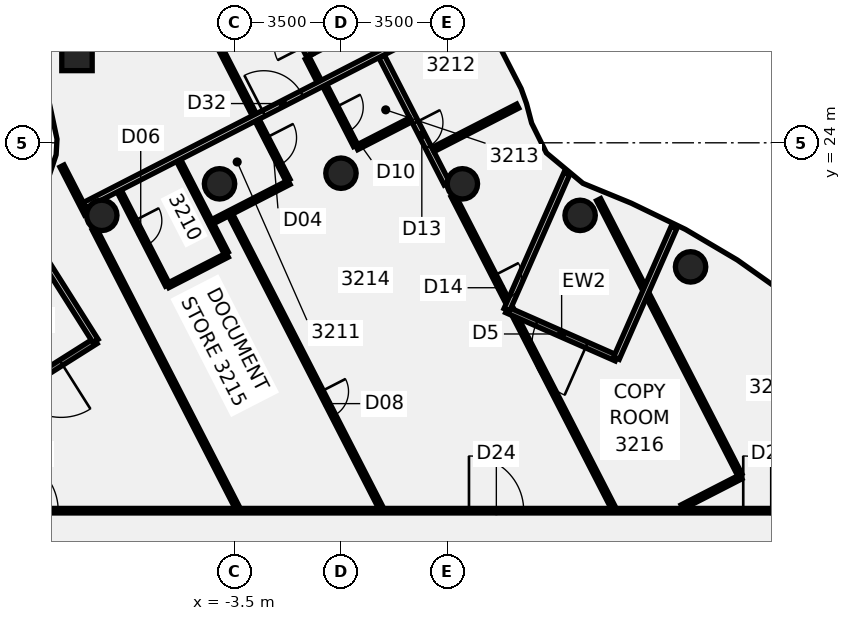
"""IFC4 building model, lengths in metres.
Left out: names, types, materials, properties, quantities, classifications, styles, units other than length and angle.
Written with IfcOpenShell. Run it as: python <this file> out.ifc"""

import sys

from ifc_helpers import new_model, si_unit, direction, frame, frame_2d, origin, origin_2d, place, context, subcontext, project, spatial, rectangle, circle, extrude, element, fill, save


model = new_model("IFC4")
c1 = context("Model", 3, precision=1e-05, world=origin(), true_north=direction((0.0, 1.0)))
c2 = subcontext(c1, "Body", "Model", "MODEL_VIEW")
j1 = project(units=[si_unit("LENGTHUNIT", "METRE"), si_unit("PLANEANGLEUNIT", "RADIAN")], contexts=[c1])
p1 = place(None, origin())
s1 = spatial("IfcSite", under=j1, at=p1, CompositionType="ELEMENT")
p2 = place(p1, origin())
s2 = spatial("IfcBuilding", under=s1, at=p2, CompositionType="ELEMENT")
p3 = place(p2, frame((0.0, 0.0, 133.0)))
s3 = spatial("IfcBuildingStorey", under=s2, at=p3, CompositionType="ELEMENT", Elevation=133.0)
for number, where, z_axis, x_axis in (
    (1, (11.5, 19.919, -0.14), (0.0, 0.0, 1.0), (1.0, 0.0, 0.0)),
    (2, (7.866, 21.613, -0.14), (0.0, 0.0, 1.0), (1.0, 0.0, 0.0)),
    (3, (3.994, 22.651, -0.14), (0.0, 0.0, 1.0), (1.0, 0.0, 0.0)),
    (4, (0.0, 23.0, -0.14), (0.0, 0.0, 1.0), (1.0, 0.0, 0.0)),
    (5, (-3.994, 22.651, -0.14), (0.0, 0.0, 1.0), (1.0, 0.0, 0.0)),
    (6, (-7.866, 21.613, -0.14), (0.0, 0.0, 1.0), (1.0, 0.0, 0.0)),
):
    element("IfcColumn", number, at=place(p3, frame(where, z_axis=z_axis, x_axis=x_axis)), inside=s3, PredefinedType="COLUMN", context=c2, shape_type="SweptSolid", body=[
        extrude(circle(Radius=0.5, at=origin_2d()), origin(), (0.0, 0.0, 1.0), 3.75),
    ])
p4 = place(p3, frame((-8.683, 26.873, -0.136), z_axis=(-0.023249815242, -0.042396721911, 0.99883029793), x_axis=(0.888891864763, 0.45636204272, 0.040061686479)))
e7 = element("IfcColumn", 7, at=p4, inside=s3, PredefinedType="COLUMN", context=c2, shape_type="SweptSolid", body=[
    extrude(rectangle(XDim=1.0, YDim=1.0, at=origin_2d()), origin(), (0.0, 0.0, 1.0), 3.749),
])
p5 = place(p3, frame((-9.176, 23.235, 0.0), z_axis=(0.0, 0.0, 1.0), x_axis=(0.456484124578, -0.889731557273, 0.0)))
e8 = element("IfcWall", 8, at=p5, inside=s3, PredefinedType="PARTITIONING", context=c2, shape_type="SweptSolid", body=[
    extrude(rectangle(XDim=1.776, YDim=0.15, at=frame_2d((0.888, 0.0))), origin(), (0.0, 0.0, 1.0), 3.01),
])
p6 = place(p3, frame((-8.116, 21.17, 0.0), z_axis=(0.0, 0.0, 1.0), x_axis=(0.456543941527, -0.889700865154, 0.0)))
e9 = element("IfcWall", 9, at=p6, inside=s3, PredefinedType="PARTITIONING", context=c2, shape_type="SweptSolid", body=[
    extrude(rectangle(XDim=10.314, YDim=0.15, at=frame_2d((5.157, 0.0))), origin(), (0.0, 0.0, 1.0), 3.01),
])
p7 = place(p3, frame((-8.932, 36.777, 0.0), z_axis=(0.0, 0.0, 1.0), x_axis=(0.456530071129, -0.889707982517, 0.0)))
e10 = element("IfcWall", 10, at=p7, inside=s3, PredefinedType="PARTITIONING", context=c2, shape_type="SweptSolid", body=[
    extrude(rectangle(XDim=15.745, YDim=0.15, at=frame_2d((7.873, 0.0))), origin(), (0.0, 0.0, 1.0), 3.01),
])
p8 = place(p7, frame((14.175, 0.0, 0.0)))
e11 = element("IfcOpeningElement", 11, at=p8, cuts=e10, PredefinedType="OPENING", context=c2, shape_type="SweptSolid", body=[
    extrude(rectangle(XDim=1.0, YDim=2.1, at=frame_2d((0.5, 1.05))), frame((0.0, 0.085, 0.0), z_axis=(0.0, -1.0, 0.0), x_axis=(1.0, 0.0, 0.0)), (0.0, 0.0, 1.0), 0.17),
])
p9 = place(p7, frame((4.425, 0.0, 0.0)))
e12 = element("IfcOpeningElement", 12, at=p9, cuts=e10, PredefinedType="OPENING", context=c2, shape_type="SweptSolid", body=[
    extrude(rectangle(XDim=0.9, YDim=2.1, at=frame_2d((0.45, 1.05))), frame((0.0, 0.085, 0.0), z_axis=(0.0, -1.0, 0.0), x_axis=(1.0, 0.0, 0.0)), (0.0, 0.0, 1.0), 0.17),
])
p10 = place(p3, frame((-7.294, 22.416, 0.0), z_axis=(0.0, 0.0, 1.0), x_axis=(0.456617130673, -0.889663304838, 0.0)))
e13 = element("IfcWall", 13, at=p10, inside=s3, PredefinedType="PARTITIONING", context=c2, shape_type="SweptSolid", body=[
    extrude(rectangle(XDim=3.48, YDim=0.15, at=frame_2d((1.74, 0.0))), origin(), (0.0, 0.0, 1.0), 3.01),
])
p11 = place(p10, frame((1.1, 0.0, 0.0)))
e14 = element("IfcOpeningElement", 14, at=p11, cuts=e13, PredefinedType="OPENING", context=c2, shape_type="SweptSolid", body=[
    extrude(rectangle(XDim=0.9, YDim=2.1, at=frame_2d((0.45, 1.05))), frame((0.0, 0.085, 0.0), z_axis=(0.0, -1.0, 0.0), x_axis=(1.0, 0.0, 0.0)), (0.0, 0.0, 1.0), 0.17),
])
p12 = place(p3, frame((-1.105, 26.783, 0.0), z_axis=(0.0, 0.0, 1.0), x_axis=(0.456670300409, -0.889636013617, 0.0)))
e15 = element("IfcWall", 15, at=p12, inside=s3, PredefinedType="PARTITIONING", context=c2, shape_type="SweptSolid", body=[
    extrude(rectangle(XDim=0.855, YDim=0.15, at=frame_2d((0.427, 0.0))), origin(), (0.0, 0.0, 1.0), 3.01),
])
p13 = place(p3, frame((-5.337, 23.42, 0.0), z_axis=(0.0, 0.0, 1.0), x_axis=(0.456682724055, -0.889629636169, 0.0)))
e16 = element("IfcWall", 16, at=p13, inside=s3, PredefinedType="PARTITIONING", context=c2, shape_type="SweptSolid", body=[
    extrude(rectangle(XDim=3.425, YDim=0.15, at=frame_2d((1.712, 0.0))), origin(), (0.0, 0.0, 1.0), 3.01),
])
p14 = place(p3, frame((-3.63, 21.627, 0.0), z_axis=(0.0, 0.0, 1.0), x_axis=(0.456496994871, -0.889724953946, 0.0)))
e17 = element("IfcWall", 17, at=p14, inside=s3, PredefinedType="PARTITIONING", context=c2, shape_type="SweptSolid", body=[
    extrude(rectangle(XDim=10.828, YDim=0.15, at=frame_2d((5.414, 0.0))), origin(), (0.0, 0.0, 1.0), 3.01),
])
p15 = place(p14, frame((6.525, 0.0, 0.0)))
e18 = element("IfcOpeningElement", 18, at=p15, cuts=e17, PredefinedType="OPENING", context=c2, shape_type="SweptSolid", body=[
    extrude(rectangle(XDim=0.9, YDim=2.1, at=frame_2d((0.45, 1.05))), frame((0.0, 0.085, 0.0), z_axis=(0.0, -1.0, 0.0), x_axis=(1.0, 0.0, 0.0)), (0.0, 0.0, 1.0), 0.17),
])
p16 = place(p3, frame((-0.532, 25.885, 0.0), z_axis=(0.0, 0.0, 1.0), x_axis=(0.456385875157, -0.889781958098, 0.0)))
e19 = element("IfcWall", 19, at=p16, inside=s3, PredefinedType="PARTITIONING", context=c2, shape_type="SweptSolid", body=[
    extrude(rectangle(XDim=2.219, YDim=0.15, at=frame_2d((1.11, 0.0))), origin(), (0.0, 0.0, 1.0), 3.01),
])
p17 = place(p16, frame((0.8, 0.0, 0.0)))
e20 = element("IfcOpeningElement", 20, at=p17, cuts=e19, PredefinedType="OPENING", context=c2, shape_type="SweptSolid", body=[
    extrude(rectangle(XDim=0.9, YDim=2.1, at=frame_2d((0.45, 1.05))), frame((0.0, 0.085, 0.0), z_axis=(0.0, -1.0, 0.0), x_axis=(1.0, 0.0, 0.0)), (0.0, 0.0, 1.0), 0.17),
])
p18 = place(p3, frame((1.336, 26.844, 0.0), z_axis=(0.0, 0.0, 1.0), x_axis=(0.456669351615, -0.889636500654, 0.0)))
e21 = element("IfcWall", 21, at=p18, inside=s3, PredefinedType="PARTITIONING", context=c2, shape_type="SweptSolid", body=[
    extrude(rectangle(XDim=4.707, YDim=0.2, at=frame_2d((2.354, 0.0))), origin(), (0.0, 0.0, 1.0), 3.01),
])
p19 = place(p18, frame((2.45, 0.0, 0.0)))
e22 = element("IfcOpeningElement", 22, at=p19, cuts=e21, PredefinedType="OPENING", context=c2, shape_type="SweptSolid", body=[
    extrude(rectangle(XDim=0.9, YDim=2.1, at=frame_2d((0.45, 1.05))), frame((0.0, 0.11, 0.0), z_axis=(0.0, -1.0, 0.0), x_axis=(1.0, 0.0, 0.0)), (0.0, 0.0, 1.0), 0.22),
])
p20 = place(p3, frame((3.69, 22.258, 0.0), z_axis=(0.0, 0.0, 1.0), x_axis=(0.45668207617, -0.889629968754, 0.0)))
e23 = element("IfcWall", 23, at=p20, inside=s3, PredefinedType="PARTITIONING", context=c2, shape_type="SweptSolid", body=[
    extrude(rectangle(XDim=11.542, YDim=0.15, at=frame_2d((5.771, 0.0))), origin(), (0.0, 0.0, 1.0), 3.01),
])
p21 = place(p20, frame((2.95, 0.0, 0.0)))
e24 = element("IfcOpeningElement", 24, at=p21, cuts=e23, PredefinedType="OPENING", context=c2, shape_type="SweptSolid", body=[
    extrude(rectangle(XDim=0.9, YDim=2.1, at=frame_2d((0.45, 1.05))), frame((0.0, 0.085, 0.0), z_axis=(0.0, -1.0, 0.0), x_axis=(1.0, 0.0, 0.0)), (0.0, 0.0, 1.0), 0.17),
])
p22 = place(p3, frame((8.476, 22.13, 0.0), z_axis=(0.0, 0.0, 1.0), x_axis=(0.456531545436, -0.889707226014, 0.0)))
e25 = element("IfcWall", 25, at=p22, inside=s3, PredefinedType="PARTITIONING", context=c2, shape_type="SweptSolid", body=[
    extrude(rectangle(XDim=10.171, YDim=0.15, at=frame_2d((5.085, 0.0))), origin(), (0.0, 0.0, 1.0), 3.01),
])
p23 = place(p3, frame((-17.065, 11.9, 0.0), z_axis=(0.0, 0.0, 1.0), x_axis=(1.0, 0.0, 0.0)))
e26 = element("IfcWall", 26, at=p23, inside=s3, PredefinedType="PARTITIONING", context=c2, shape_type="SweptSolid", body=[
    extrude(rectangle(XDim=34.165, YDim=0.15, at=frame_2d((17.083, 0.0))), origin(), (0.0, 0.0, 1.0), 3.01),
])
p24 = place(p23, frame((21.276, 0.0, 0.0)))
e27 = element("IfcOpeningElement", 27, at=p24, cuts=e26, PredefinedType="OPENING", context=c2, shape_type="SweptSolid", body=[
    extrude(rectangle(XDim=1.8, YDim=2.1, at=frame_2d((0.9, 1.05))), frame((0.0, 0.085, 0.0), z_axis=(0.0, -1.0, 0.0), x_axis=(1.0, 0.0, 0.0)), (0.0, 0.0, 1.0), 0.17),
])
p25 = place(p23, frame((30.297, 0.0, 0.0)))
e28 = element("IfcOpeningElement", 28, at=p25, cuts=e26, PredefinedType="OPENING", context=c2, shape_type="SweptSolid", body=[
    extrude(rectangle(XDim=1.8, YDim=2.1, at=frame_2d((0.9, 1.05))), frame((0.0, 0.085, 0.0), z_axis=(0.0, -1.0, 0.0), x_axis=(1.0, 0.0, 0.0)), (0.0, 0.0, 1.0), 0.17),
])
p26 = place(p23, frame((5.965, 0.0, 0.0)))
e29 = element("IfcOpeningElement", 29, at=p26, cuts=e26, PredefinedType="OPENING", context=c2, shape_type="SweptSolid", body=[
    extrude(rectangle(XDim=1.8, YDim=2.1, at=frame_2d((0.9, 1.05))), frame((0.0, 0.085, 0.0), z_axis=(0.0, -1.0, 0.0), x_axis=(1.0, 0.0, 0.0)), (0.0, 0.0, 1.0), 0.17),
])
p27 = place(p3, frame((-8.426, 21.948, 0.0), z_axis=(0.0, 0.0, 1.0), x_axis=(0.889606613969, 0.456727569108, 0.0)))
e30 = element("IfcWall", 30, at=p27, inside=s3, PredefinedType="PARTITIONING", context=c2, shape_type="SweptSolid", body=[
    extrude(rectangle(XDim=14.219, YDim=0.2, at=frame_2d((7.11, 0.0))), origin(), (0.0, 0.0, 1.0), 3.01),
])
p28 = place(p27, frame((6.62, 0.0, 0.0)))
e31 = element("IfcOpeningElement", 31, at=p28, cuts=e30, PredefinedType="OPENING", context=c2, shape_type="SweptSolid", body=[
    extrude(rectangle(XDim=1.4, YDim=2.1, at=frame_2d((0.7, 1.05))), frame((0.0, 0.11, 0.0), z_axis=(0.0, -1.0, 0.0), x_axis=(1.0, 0.0, 0.0)), (0.0, 0.0, 1.0), 0.22),
])
p29 = place(p3, frame((-5.696, 19.302, 0.0), z_axis=(0.0, 0.0, 1.0), x_axis=(0.889761986003, 0.456424811183, 0.0)))
e32 = element("IfcWall", 32, at=p29, inside=s3, PredefinedType="PARTITIONING", context=c2, shape_type="SweptSolid", body=[
    extrude(rectangle(XDim=2.199, YDim=0.15, at=frame_2d((1.1, 0.0))), origin(), (0.0, 0.0, 1.0), 3.01),
])
p30 = place(p3, frame((3.028, 23.778, 0.0), z_axis=(0.0, 0.0, 1.0), x_axis=(0.889763060591, 0.456422716358, 0.0)))
e33 = element("IfcWall", 33, at=p30, inside=s3, PredefinedType="PARTITIONING", context=c2, shape_type="SweptSolid", body=[
    extrude(rectangle(XDim=3.131, YDim=0.15, at=frame_2d((1.565, 0.0))), origin(), (0.0, 0.0, 1.0), 3.01),
])
p31 = place(p3, frame((-4.22, 21.408, 0.0), z_axis=(0.0, 0.0, 1.0), x_axis=(0.889499615921, 0.456935918128, 0.0)))
e34 = element("IfcWall", 34, at=p31, inside=s3, PredefinedType="PARTITIONING", context=c2, shape_type="SweptSolid", body=[
    extrude(rectangle(XDim=2.825, YDim=0.15, at=frame_2d((1.413, 0.0))), origin(), (0.0, 0.0, 1.0), 3.01),
])
p32 = place(p3, frame((0.516, 23.841, 0.0), z_axis=(0.0, 0.0, 1.0), x_axis=(0.889517422717, 0.456901252662, 0.0)))
e35 = element("IfcWall", 35, at=p32, inside=s3, PredefinedType="PARTITIONING", context=c2, shape_type="SweptSolid", body=[
    extrude(rectangle(XDim=2.0, YDim=0.15, at=frame_2d((1.0, 0.0))), origin(), (0.0, 0.0, 1.0), 3.01),
])
p33 = place(p3, frame((11.222, 12.023, 0.0), z_axis=(0.0, 0.0, 1.0), x_axis=(0.889721403814, 0.456503914108, 0.0)))
e36 = element("IfcWall", 36, at=p33, inside=s3, PredefinedType="PARTITIONING", context=c2, shape_type="SweptSolid", body=[
    extrude(rectangle(XDim=2.17, YDim=0.15, at=frame_2d((1.085, 0.0))), origin(), (0.0, 0.0, 1.0), 3.01),
])
p34 = place(p3, frame((9.061, 16.918, 0.0), z_axis=(0.0, 0.0, 1.0), x_axis=(-0.915163294104, 0.403083297999, 0.0)))
e37 = element("IfcWall", 37, at=p34, inside=s3, PredefinedType="SOLIDWALL", context=c2, shape_type="SweptSolid", body=[
    extrude(rectangle(XDim=3.94, YDim=0.2, at=frame_2d((1.97, 0.0))), origin(), (0.0, 0.0, 1.0), 3.61),
])
p35 = place(p34, frame((1.07, 0.0, 0.0)))
e38 = element("IfcOpeningElement", 38, at=p35, cuts=e37, PredefinedType="OPENING", context=c2, shape_type="SweptSolid", body=[
    extrude(rectangle(XDim=1.8, YDim=2.4, at=frame_2d((0.9, 1.2))), frame((0.0, 0.11, 0.0), z_axis=(0.0, -1.0, 0.0), x_axis=(1.0, 0.0, 0.0)), (0.0, 0.0, 1.0), 0.22),
])
p36 = place(p3, frame((9.062, 16.918, 0.0), z_axis=(0.0, 0.0, 1.0), x_axis=(0.40309695737, 0.915157277717, 0.0)))
e39 = element("IfcWall", 39, at=p36, inside=s3, PredefinedType="SOLIDWALL", context=c2, shape_type="SweptSolid", body=[
    extrude(rectangle(XDim=4.703, YDim=0.2, at=frame_2d((2.352, 0.0))), origin(), (0.0, 0.0, 1.0), 3.61),
])
p37 = place(p3, frame((5.456, 18.506, 0.0), z_axis=(0.0, 0.0, 1.0), x_axis=(0.403071348588, 0.915168557124, 0.0)))
e40 = element("IfcWall", 40, at=p37, inside=s3, PredefinedType="SOLIDWALL", context=c2, shape_type="SweptSolid", body=[
    extrude(rectangle(XDim=4.893, YDim=0.2, at=frame_2d((2.446, 0.0))), origin(), (0.0, 0.0, 1.0), 3.61),
])
p38 = place(p3, frame((-8.073, 17.482, 0.0), z_axis=(0.0, 0.0, 1.0), x_axis=(-0.845417528595, -0.534105984187, 0.0)))
e41 = element("IfcWall", 41, at=p38, inside=s3, PredefinedType="SOLIDWALL", context=c2, shape_type="SweptSolid", body=[
    extrude(rectangle(XDim=4.471, YDim=0.2, at=frame_2d((2.235, 0.0))), origin(), (0.0, 0.0, 1.0), 3.61),
])
p39 = place(p38, frame((1.335, 0.0, 0.0)))
e42 = element("IfcOpeningElement", 42, at=p39, cuts=e41, PredefinedType="OPENING", context=c2, shape_type="SweptSolid", body=[
    extrude(rectangle(XDim=1.8, YDim=2.4, at=frame_2d((0.9, 1.2))), frame((0.0, 0.11, 0.0), z_axis=(0.0, -1.0, 0.0), x_axis=(1.0, 0.0, 0.0)), (0.0, 0.0, 1.0), 0.22),
])
p40 = place(p3, frame((-8.073, 17.482, 0.0), z_axis=(0.0, 0.0, 1.0), x_axis=(-0.534101065581, 0.845420635982, 0.0)))
e43 = element("IfcWall", 43, at=p40, inside=s3, PredefinedType="SOLIDWALL", context=c2, shape_type="SweptSolid", body=[
    extrude(rectangle(XDim=4.759, YDim=0.2, at=frame_2d((2.38, 0.0))), origin(), (0.0, 0.0, 1.0), 3.61),
])
p41 = place(p3, frame((-1.035, 26.864, -0.14), z_axis=(0.0, 0.0, 1.0), x_axis=(-0.456546705756, 0.889699446703, 0.0)))
e44 = element("IfcWall", 44, at=p41, inside=s3, PredefinedType="SHEAR", context=c2, shape_type="SweptSolid", body=[
    extrude(rectangle(XDim=6.7, YDim=0.2, at=frame_2d((3.35, 0.0))), origin(), (0.0, 0.0, 1.0), 3.15),
])
p42 = place(p41, frame((0.35, 0.0, 0.0)))
e45 = element("IfcOpeningElement", 45, at=p42, cuts=e44, PredefinedType="OPENING", context=c2, shape_type="SweptSolid", body=[
    extrude(rectangle(XDim=1.0, YDim=2.1, at=frame_2d((0.5, 1.05))), frame((0.0, 0.11, 0.0), z_axis=(0.0, -1.0, 0.0), x_axis=(1.0, 0.0, 0.0)), (0.0, 0.0, 1.0), 0.22),
])
p43 = place(p3, frame((1.855, 28.46, -0.14), z_axis=(0.0, 0.0, 1.0), x_axis=(-0.889693512727, -0.456558269459, 0.0)))
e46 = element("IfcWall", 46, at=p43, inside=s3, PredefinedType="SHEAR", context=c2, shape_type="SweptSolid", body=[
    extrude(rectangle(XDim=3.2, YDim=0.2, at=frame_2d((1.6, 0.0))), origin(), (0.0, 0.0, 1.0), 3.15),
])
p44 = place(p8, frame((1.0, 0.0, 0.0), z_axis=(0.0, 0.0, 1.0), x_axis=(-1.0, 0.0, 0.0)))
e47 = element("IfcDoor", 47, at=p44, inside=s3, OperationType="SINGLE_SWING_RIGHT", PredefinedType="DOOR", context=c2, shape_type="SweptSolid", body=[
    extrude(rectangle(XDim=1.0, YDim=2.1, at=frame_2d((0.5, 1.05))), frame((0.0, 0.025, 0.0), z_axis=(0.0, -1.0, 0.0), x_axis=(1.0, 0.0, 0.0)), (0.0, 0.0, 1.0), 0.05),
])
fill(e11, e47)
p45 = place(p11, origin())
e48 = element("IfcDoor", 48, at=p45, inside=s3, OperationType="SINGLE_SWING_RIGHT", PredefinedType="DOOR", context=c2, shape_type="SweptSolid", body=[
    extrude(rectangle(XDim=0.9, YDim=2.1, at=frame_2d((0.45, 1.05))), frame((0.0, 0.025, 0.0), z_axis=(0.0, -1.0, 0.0), x_axis=(1.0, 0.0, 0.0)), (0.0, 0.0, 1.0), 0.05),
])
fill(e14, e48)
p46 = place(p15, frame((0.9, 0.0, 0.0), z_axis=(0.0, 0.0, 1.0), x_axis=(-1.0, 0.0, 0.0)))
e49 = element("IfcDoor", 49, at=p46, inside=s3, OperationType="SINGLE_SWING_RIGHT", PredefinedType="DOOR", context=c2, shape_type="SweptSolid", body=[
    extrude(rectangle(XDim=0.9, YDim=2.1, at=frame_2d((0.45, 1.05))), frame((0.0, 0.025, 0.0), z_axis=(0.0, -1.0, 0.0), x_axis=(1.0, 0.0, 0.0)), (0.0, 0.0, 1.0), 0.05),
])
fill(e18, e49)
p47 = place(p17, origin())
e50 = element("IfcDoor", 50, at=p47, inside=s3, OperationType="SINGLE_SWING_LEFT", PredefinedType="DOOR", context=c2, shape_type="SweptSolid", body=[
    extrude(rectangle(XDim=0.9, YDim=2.1, at=frame_2d((0.45, 1.05))), frame((0.0, 0.025, 0.0), z_axis=(0.0, -1.0, 0.0), x_axis=(1.0, 0.0, 0.0)), (0.0, 0.0, 1.0), 0.05),
])
fill(e20, e50)
p48 = place(p19, origin())
e51 = element("IfcDoor", 51, at=p48, inside=s3, OperationType="SINGLE_SWING_LEFT", PredefinedType="DOOR", context=c2, shape_type="SweptSolid", body=[
    extrude(rectangle(XDim=0.9, YDim=2.1, at=frame_2d((0.45, 1.05))), frame((0.0, 0.025, 0.0), z_axis=(0.0, -1.0, 0.0), x_axis=(1.0, 0.0, 0.0)), (0.0, 0.0, 1.0), 0.05),
])
fill(e22, e51)
p49 = place(p21, origin())
e52 = element("IfcDoor", 52, at=p49, inside=s3, OperationType="SINGLE_SWING_RIGHT", PredefinedType="DOOR", context=c2, shape_type="SweptSolid", body=[
    extrude(rectangle(XDim=0.9, YDim=2.1, at=frame_2d((0.45, 1.05))), frame((0.0, 0.025, 0.0), z_axis=(0.0, -1.0, 0.0), x_axis=(1.0, 0.0, 0.0)), (0.0, 0.0, 1.0), 0.05),
])
fill(e24, e52)
p50 = place(p24, frame((1.8, 0.0, 0.0), z_axis=(0.0, 0.0, 1.0), x_axis=(-1.0, 0.0, 0.0)))
e53 = element("IfcDoor", 53, at=p50, inside=s3, OperationType="DOUBLE_DOOR_SINGLE_SWING", PredefinedType="DOOR", context=c2, shape_type="SweptSolid", body=[
    extrude(rectangle(XDim=1.8, YDim=2.1, at=frame_2d((0.9, 1.05))), frame((0.0, 0.025, 0.0), z_axis=(0.0, -1.0, 0.0), x_axis=(1.0, 0.0, 0.0)), (0.0, 0.0, 1.0), 0.05),
])
fill(e27, e53)
p51 = place(p25, origin())
e54 = element("IfcDoor", 54, at=p51, inside=s3, OperationType="DOUBLE_DOOR_SINGLE_SWING", PredefinedType="DOOR", context=c2, shape_type="SweptSolid", body=[
    extrude(rectangle(XDim=1.8, YDim=2.1, at=frame_2d((0.9, 1.05))), frame((0.0, 0.025, 0.0), z_axis=(0.0, -1.0, 0.0), x_axis=(1.0, 0.0, 0.0)), (0.0, 0.0, 1.0), 0.05),
])
fill(e28, e54)
p52 = place(p26, origin())
e55 = element("IfcDoor", 55, at=p52, inside=s3, OperationType="DOUBLE_DOOR_SINGLE_SWING", PredefinedType="DOOR", context=c2, shape_type="SweptSolid", body=[
    extrude(rectangle(XDim=1.8, YDim=2.1, at=frame_2d((0.9, 1.05))), frame((0.0, 0.025, 0.0), z_axis=(0.0, -1.0, 0.0), x_axis=(1.0, 0.0, 0.0)), (0.0, 0.0, 1.0), 0.05),
])
fill(e29, e55)
p53 = place(p28, frame((1.4, 0.0, 0.0), z_axis=(0.0, 0.0, 1.0), x_axis=(-1.0, 0.0, 0.0)))
e56 = element("IfcDoor", 56, at=p53, inside=s3, OperationType="DOUBLE_DOOR_SINGLE_SWING", PredefinedType="DOOR", context=c2, shape_type="SweptSolid", body=[
    extrude(rectangle(XDim=1.4, YDim=2.1, at=frame_2d((0.7, 1.05))), frame((0.0, 0.025, 0.0), z_axis=(0.0, -1.0, 0.0), x_axis=(1.0, 0.0, 0.0)), (0.0, 0.0, 1.0), 0.05),
])
fill(e31, e56)
p54 = place(p35, origin())
e57 = element("IfcDoor", 57, at=p54, inside=s3, OperationType="SINGLE_SWING_LEFT", PredefinedType="DOOR", context=c2, shape_type="SweptSolid", body=[
    extrude(rectangle(XDim=1.8, YDim=2.4, at=frame_2d((0.9, 1.2))), frame((0.0, 0.025, 0.0), z_axis=(0.0, -1.0, 0.0), x_axis=(1.0, 0.0, 0.0)), (0.0, 0.0, 1.0), 0.05),
])
fill(e38, e57)
p55 = place(p39, origin())
e58 = element("IfcDoor", 58, at=p55, inside=s3, OperationType="SINGLE_SWING_LEFT", PredefinedType="DOOR", context=c2, shape_type="SweptSolid", body=[
    extrude(rectangle(XDim=1.8, YDim=2.4, at=frame_2d((0.9, 1.2))), frame((0.0, 0.025, 0.0), z_axis=(0.0, -1.0, 0.0), x_axis=(1.0, 0.0, 0.0)), (0.0, 0.0, 1.0), 0.05),
])
fill(e42, e58)
save(model, sys.argv[1])
